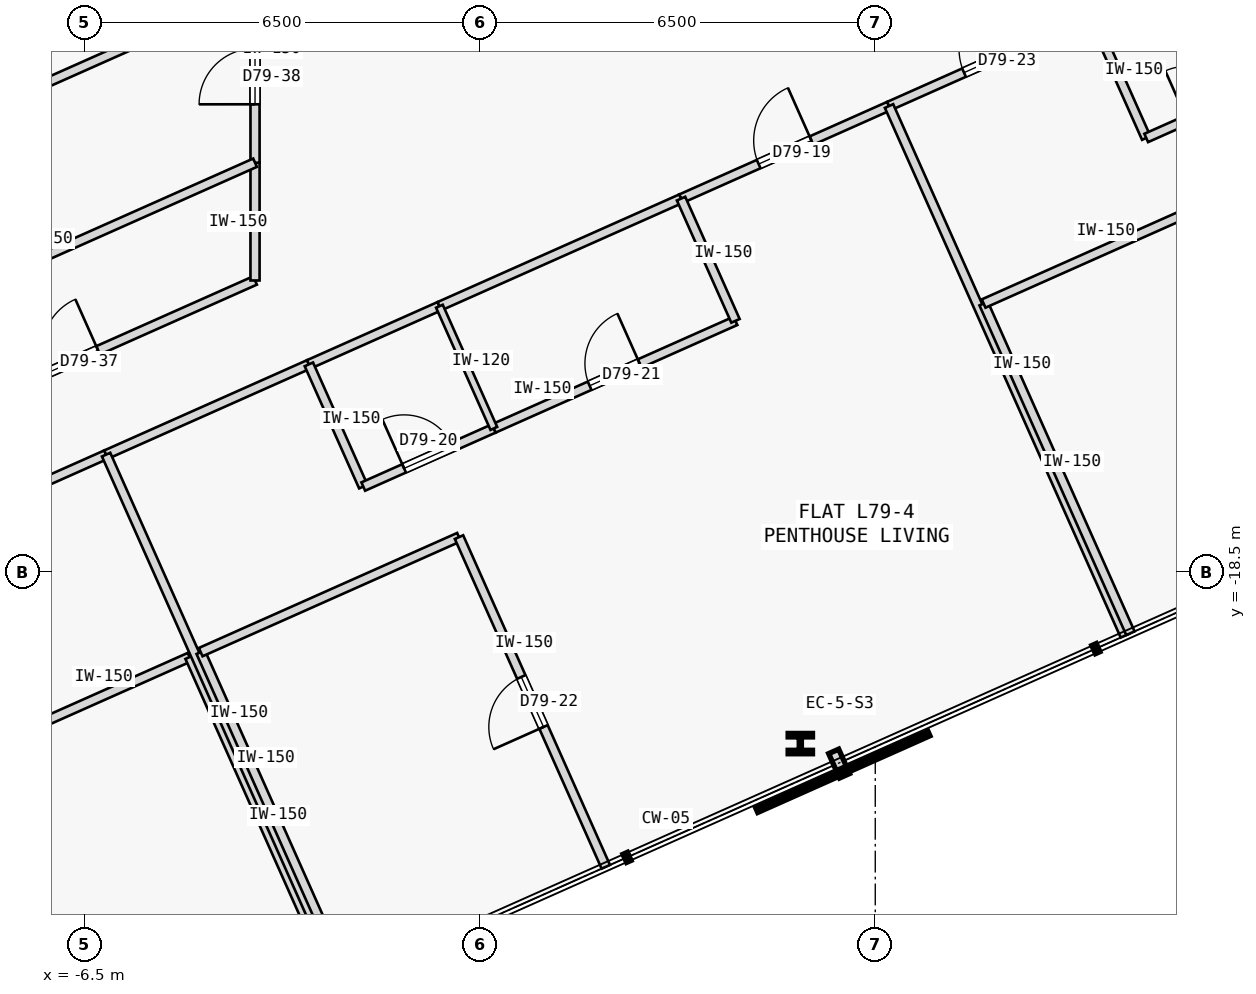
"""IFC4 building model, lengths in metres.
Left out: names, types, materials, properties, quantities, classifications, styles, units other than length and angle.
Written with IfcOpenShell. Run it as: python <this file> out.ifc"""

import sys

from ifc_helpers import new_model, si_unit, direction, frame, frame_2d, origin, origin_2d, place, context, subcontext, project, spatial, rectangle, i_section, extrude, element, fill, save


model = new_model("IFC4")
c1 = context("Model", 3, precision=1e-05, world=origin(), true_north=direction((0.0, 1.0)))
c2 = subcontext(c1, "Body", "Model", "MODEL_VIEW")
j1 = project(units=[si_unit("LENGTHUNIT", "METRE"), si_unit("PLANEANGLEUNIT", "RADIAN")], contexts=[c1])
p1 = place(None, origin())
s1 = spatial("IfcSite", under=j1, at=p1, CompositionType="ELEMENT")
p2 = place(p1, origin())
s2 = spatial("IfcBuilding", under=s1, at=p2, CompositionType="ELEMENT")
p3 = place(p2, frame((0.0, 0.0, 295.3)))
s3 = spatial("IfcBuildingStorey", under=s2, at=p3, CompositionType="ELEMENT", Elevation=295.3)
p4 = place(p3, frame((5.268, -21.319, 0.0), z_axis=(0.0, 0.0, 1.0), x_axis=(1.0, 0.0, 0.0)))
e1 = element("IfcColumn", 1, at=p4, inside=s3, PredefinedType="COLUMN", context=c2, shape_type="SweptSolid", body=[
    extrude(i_section(OverallWidth=0.401, OverallDepth=0.335, WebThickness=0.036, FlangeThickness=0.058, FilletRadius=0.015, at=origin_2d()), origin(), (0.0, 0.0, 1.0), 3.35),
])
p5 = place(p3, frame((-10.221, -18.38, 0.0), z_axis=(0.0, 0.0, 1.0), x_axis=(0.913542602601, 0.406743055543, 0.0)))
e2 = element("IfcWall", 2, at=p5, inside=s3, PredefinedType="PARTITIONING", context=c2, shape_type="SweptSolid", body=[
    extrude(rectangle(XDim=4.458, YDim=0.15, at=frame_2d((2.229, 0.0))), origin(), (0.0, 0.0, 1.0), 3.125),
])
p6 = place(p5, frame((1.754, 0.0, 0.0)))
e3 = element("IfcOpeningElement", 3, at=p6, cuts=e2, PredefinedType="OPENING", context=c2, shape_type="SweptSolid", body=[
    extrude(rectangle(XDim=0.95, YDim=2.15, at=frame_2d((0.475, 1.075))), frame((0.0, 0.085, 0.0), z_axis=(0.0, -1.0, 0.0), x_axis=(1.0, 0.0, 0.0)), (0.0, 0.0, 1.0), 0.17),
])
p7 = place(p3, frame((-6.149, -16.567, 0.0), z_axis=(0.0, 0.0, 1.0), x_axis=(0.913543802, 0.40674036169, 0.0)))
e4 = element("IfcWall", 4, at=p7, inside=s3, PredefinedType="PARTITIONING", context=c2, shape_type="SweptSolid", body=[
    extrude(rectangle(XDim=3.65, YDim=0.15, at=frame_2d((1.825, 0.0))), origin(), (0.0, 0.0, 1.0), 3.125),
])
p8 = place(p3, frame((3.306, -12.357, 0.0), z_axis=(0.0, 0.0, 1.0), x_axis=(0.913550513402, 0.406725287464, 0.0)))
e5 = element("IfcWall", 5, at=p8, inside=s3, PredefinedType="PARTITIONING", context=c2, shape_type="SweptSolid", body=[
    extrude(rectangle(XDim=3.744, YDim=0.15, at=frame_2d((1.872, 0.0))), origin(), (0.0, 0.0, 1.0), 3.125),
])
p9 = place(p8, frame((1.397, 0.0, 0.0)))
e6 = element("IfcOpeningElement", 6, at=p9, cuts=e5, PredefinedType="OPENING", context=c2, shape_type="SweptSolid", body=[
    extrude(rectangle(XDim=0.95, YDim=2.15, at=frame_2d((0.475, 1.075))), frame((0.0, 0.085, 0.0), z_axis=(0.0, -1.0, 0.0), x_axis=(1.0, 0.0, 0.0)), (0.0, 0.0, 1.0), 0.17),
])
p10 = place(p3, frame((-2.814, -15.082, 0.0), z_axis=(0.0, 0.0, 1.0), x_axis=(0.913558622212, 0.406707073682, 0.0)))
e7 = element("IfcWall", 7, at=p10, inside=s3, PredefinedType="PARTITIONING", context=c2, shape_type="SweptSolid", body=[
    extrude(rectangle(XDim=2.35, YDim=0.15, at=frame_2d((1.175, 0.0))), origin(), (0.0, 0.0, 1.0), 3.125),
])
p11 = place(p3, frame((-0.667, -14.126, 0.0), z_axis=(0.0, 0.0, 1.0), x_axis=(0.913545193015, 0.406737237438, 0.0)))
e8 = element("IfcWall", 8, at=p11, inside=s3, PredefinedType="PARTITIONING", context=c2, shape_type="SweptSolid", body=[
    extrude(rectangle(XDim=4.35, YDim=0.15, at=frame_2d((2.175, 0.0))), origin(), (0.0, 0.0, 1.0), 3.125),
])
p12 = place(p3, frame((6.727, -10.834, 0.0), z_axis=(0.0, 0.0, 1.0), x_axis=(0.913543802, 0.40674036169, 0.0)))
e9 = element("IfcWall", 9, at=p12, inside=s3, PredefinedType="PARTITIONING", context=c2, shape_type="SweptSolid", body=[
    extrude(rectangle(XDim=3.65, YDim=0.15, at=frame_2d((1.825, 0.0))), origin(), (0.0, 0.0, 1.0), 3.125),
])
p13 = place(p12, frame((1.35, 0.0, 0.0)))
e10 = element("IfcOpeningElement", 10, at=p13, cuts=e9, PredefinedType="OPENING", context=c2, shape_type="SweptSolid", body=[
    extrude(rectangle(XDim=0.95, YDim=2.15, at=frame_2d((0.475, 1.075))), frame((0.0, 0.085, 0.0), z_axis=(0.0, -1.0, 0.0), x_axis=(1.0, 0.0, 0.0)), (0.0, 0.0, 1.0), 0.17),
])
p14 = place(p3, frame((-9.702, -16.375, 0.0), z_axis=(0.0, 0.0, 1.0), x_axis=(0.913552389019, 0.406721074594, 0.0)))
e11 = element("IfcWall", 11, at=p14, inside=s3, PredefinedType="PARTITIONING", context=c2, shape_type="SweptSolid", body=[
    extrude(rectangle(XDim=6.57, YDim=0.15, at=frame_2d((3.285, 0.0))), origin(), (0.0, 0.0, 1.0), 3.125),
])
p15 = place(p14, frame((2.825, 0.0, 0.0)))
e12 = element("IfcOpeningElement", 12, at=p15, cuts=e11, PredefinedType="OPENING", context=c2, shape_type="SweptSolid", body=[
    extrude(rectangle(XDim=0.92, YDim=2.15, at=frame_2d((0.46, 1.075))), frame((0.0, 0.085, 0.0), z_axis=(0.0, -1.0, 0.0), x_axis=(1.0, 0.0, 0.0)), (0.0, 0.0, 1.0), 0.17),
])
p16 = place(p3, frame((-3.7, -13.703, 0.0), z_axis=(0.0, 0.0, 1.0), x_axis=(0.000126055716, 0.999999992055, 0.0)))
e13 = element("IfcWall", 13, at=p16, inside=s3, PredefinedType="PARTITIONING", context=c2, shape_type="SweptSolid", body=[
    extrude(rectangle(XDim=1.937, YDim=0.15, at=frame_2d((0.968, 0.0))), origin(), (0.0, 0.0, 1.0), 3.125),
])
p17 = place(p3, frame((-3.7, -11.767, 0.0), z_axis=(0.0, 0.0, 1.0), x_axis=(-0.000171850831, 0.999999985234, 0.0)))
e14 = element("IfcWall", 14, at=p17, inside=s3, PredefinedType="PARTITIONING", context=c2, shape_type="SweptSolid", body=[
    extrude(rectangle(XDim=2.841, YDim=0.15, at=frame_2d((1.421, 0.0))), origin(), (0.0, 0.0, 1.0), 3.125),
])
p18 = place(p17, frame((0.961, 0.0, 0.0)))
e15 = element("IfcOpeningElement", 15, at=p18, cuts=e14, PredefinedType="OPENING", context=c2, shape_type="SweptSolid", body=[
    extrude(rectangle(XDim=0.92, YDim=2.15, at=frame_2d((0.46, 1.075))), frame((0.0, 0.085, 0.0), z_axis=(0.0, -1.0, 0.0), x_axis=(1.0, 0.0, 0.0)), (0.0, 0.0, 1.0), 0.17),
])
p19 = place(p3, frame((-6.61, -27.21, 0.0), z_axis=(0.0, 0.0, 1.0), x_axis=(-0.406699433793, 0.913562023375, 0.0)))
e16 = element("IfcWall", 16, at=p19, inside=s3, PredefinedType="PARTITIONING", context=c2, shape_type="SweptSolid", body=[
    extrude(rectangle(XDim=5.935, YDim=0.15, at=frame_2d((2.968, 0.0))), origin(), (0.0, 0.0, 1.0), 3.125),
])
p20 = place(p19, frame((2.518, 0.0, 0.0)))
e17 = element("IfcOpeningElement", 17, at=p20, cuts=e16, PredefinedType="OPENING", context=c2, shape_type="SweptSolid", body=[
    extrude(rectangle(XDim=0.9, YDim=2.15, at=frame_2d((0.45, 1.075))), frame((0.0, 0.085, 0.0), z_axis=(0.0, -1.0, 0.0), x_axis=(1.0, 0.0, 0.0)), (0.0, 0.0, 1.0), 0.17),
])
p21 = place(p3, frame((-9.024, -21.788, 0.0), z_axis=(0.0, 0.0, 1.0), x_axis=(0.913564558304, 0.406693739576, 0.0)))
e18 = element("IfcWall", 18, at=p21, inside=s3, PredefinedType="PARTITIONING", context=c2, shape_type="SweptSolid", body=[
    extrude(rectangle(XDim=4.65, YDim=0.15, at=frame_2d((2.325, 0.0))), origin(), (0.0, 0.0, 1.0), 3.125),
])
p22 = place(p3, frame((-2.362, -25.318, 0.0), z_axis=(0.0, 0.0, 1.0), x_axis=(-0.406714717734, 0.913555219119, 0.0)))
e19 = element("IfcWall", 19, at=p22, inside=s3, PredefinedType="PARTITIONING", context=c2, shape_type="SweptSolid", body=[
    extrude(rectangle(XDim=5.935, YDim=0.15, at=frame_2d((2.967, 0.0))), origin(), (0.0, 0.0, 1.0), 3.125),
])
p23 = place(p3, frame((-2.271, -25.278, 0.0), z_axis=(0.0, 0.0, 1.0), x_axis=(-0.406751296215, 0.913538933504, 0.0)))
e20 = element("IfcWall", 20, at=p23, inside=s3, PredefinedType="PARTITIONING", context=c2, shape_type="SweptSolid", body=[
    extrude(rectangle(XDim=9.535, YDim=0.15, at=frame_2d((4.768, 0.0))), origin(), (0.0, 0.0, 1.0), 3.125),
])
p24 = place(p3, frame((-1.92, -17.092, 0.0), z_axis=(0.0, 0.0, 1.0), x_axis=(-0.406725294076, 0.913550510459, 0.0)))
e21 = element("IfcWall", 21, at=p24, inside=s3, PredefinedType="PARTITIONING", context=c2, shape_type="SweptSolid", body=[
    extrude(rectangle(XDim=2.2, YDim=0.15, at=frame_2d((1.1, 0.0))), origin(), (0.0, 0.0, 1.0), 3.125),
])
p25 = place(p3, frame((-1.92, -17.092, 0.0), z_axis=(0.0, 0.0, 1.0), x_axis=(0.913558622212, 0.406707073682, 0.0)))
e22 = element("IfcWall", 22, at=p25, inside=s3, PredefinedType="PARTITIONING", context=c2, shape_type="SweptSolid", body=[
    extrude(rectangle(XDim=2.35, YDim=0.15, at=frame_2d((1.175, 0.0))), origin(), (0.0, 0.0, 1.0), 3.125),
])
p26 = place(p25, frame((0.735, 0.0, 0.0)))
e23 = element("IfcOpeningElement", 23, at=p26, cuts=e22, PredefinedType="OPENING", context=c2, shape_type="SweptSolid", body=[
    extrude(rectangle(XDim=0.88, YDim=2.15, at=frame_2d((0.44, 1.075))), frame((0.0, 0.085, 0.0), z_axis=(0.0, -1.0, 0.0), x_axis=(1.0, 0.0, 0.0)), (0.0, 0.0, 1.0), 0.17),
])
p27 = place(p3, frame((0.227, -16.136, 0.0), z_axis=(0.0, 0.0, 1.0), x_axis=(0.913545193015, 0.406737237438, 0.0)))
e24 = element("IfcWall", 24, at=p27, inside=s3, PredefinedType="PARTITIONING", context=c2, shape_type="SweptSolid", body=[
    extrude(rectangle(XDim=4.35, YDim=0.15, at=frame_2d((2.175, 0.0))), origin(), (0.0, 0.0, 1.0), 3.125),
])
p28 = place(p27, frame((1.725, 0.0, 0.0)))
e25 = element("IfcOpeningElement", 25, at=p28, cuts=e24, PredefinedType="OPENING", context=c2, shape_type="SweptSolid", body=[
    extrude(rectangle(XDim=0.9, YDim=2.15, at=frame_2d((0.45, 1.075))), frame((0.0, 0.085, 0.0), z_axis=(0.0, -1.0, 0.0), x_axis=(1.0, 0.0, 0.0)), (0.0, 0.0, 1.0), 0.17),
])
p29 = place(p3, frame((4.201, -14.367, 0.0), z_axis=(0.0, 0.0, 1.0), x_axis=(-0.406725294076, 0.913550510459, 0.0)))
e26 = element("IfcWall", 26, at=p29, inside=s3, PredefinedType="PARTITIONING", context=c2, shape_type="SweptSolid", body=[
    extrude(rectangle(XDim=2.2, YDim=0.15, at=frame_2d((1.1, 0.0))), origin(), (0.0, 0.0, 1.0), 3.125),
])
p30 = place(p3, frame((-2.179, -25.237, 0.0), z_axis=(0.0, 0.0, 1.0), x_axis=(-0.406749048544, 0.913539934271, 0.0)))
e27 = element("IfcWall", 27, at=p30, inside=s3, PredefinedType="PARTITIONING", context=c2, shape_type="SweptSolid", body=[
    extrude(rectangle(XDim=5.935, YDim=0.15, at=frame_2d((2.968, 0.0))), origin(), (0.0, 0.0, 1.0), 3.125),
])
p31 = place(p3, frame((-4.593, -19.815, 0.0), z_axis=(0.0, 0.0, 1.0), x_axis=(0.91354505039, 0.40673755778, 0.0)))
e28 = element("IfcWall", 28, at=p31, inside=s3, PredefinedType="PARTITIONING", context=c2, shape_type="SweptSolid", body=[
    extrude(rectangle(XDim=4.65, YDim=0.15, at=frame_2d((2.325, 0.0))), origin(), (0.0, 0.0, 1.0), 3.125),
])
p32 = place(p3, frame((2.069, -23.346, 0.0), z_axis=(0.0, 0.0, 1.0), x_axis=(-0.406699433793, 0.913562023375, 0.0)))
e29 = element("IfcWall", 29, at=p32, inside=s3, PredefinedType="PARTITIONING", context=c2, shape_type="SweptSolid", body=[
    extrude(rectangle(XDim=5.935, YDim=0.15, at=frame_2d((2.968, 0.0))), origin(), (0.0, 0.0, 1.0), 3.125),
])
p33 = place(p32, frame((2.518, 0.0, 0.0)))
e30 = element("IfcOpeningElement", 30, at=p33, cuts=e29, PredefinedType="OPENING", context=c2, shape_type="SweptSolid", body=[
    extrude(rectangle(XDim=0.9, YDim=2.15, at=frame_2d((0.45, 1.075))), frame((0.0, 0.085, 0.0), z_axis=(0.0, -1.0, 0.0), x_axis=(1.0, 0.0, 0.0)), (0.0, 0.0, 1.0), 0.17),
])
p34 = place(p3, frame((10.605, -19.545, 0.0), z_axis=(0.0, 0.0, 1.0), x_axis=(-0.406760810574, 0.913534697196, 0.0)))
e31 = element("IfcWall", 31, at=p34, inside=s3, PredefinedType="PARTITIONING", context=c2, shape_type="SweptSolid", body=[
    extrude(rectangle(XDim=9.535, YDim=0.15, at=frame_2d((4.768, 0.0))), origin(), (0.0, 0.0, 1.0), 3.125),
])
p35 = place(p3, frame((0.227, -16.136, 0.0), z_axis=(0.0, 0.0, 1.0), x_axis=(-0.406725294076, 0.913550510459, 0.0)))
e32 = element("IfcWall", 32, at=p35, inside=s3, PredefinedType="PARTITIONING", context=c2, shape_type="SweptSolid", body=[
    extrude(rectangle(XDim=2.2, YDim=0.12, at=frame_2d((1.1, 0.0))), origin(), (0.0, 0.0, 1.0), 3.125),
])
p36 = place(p3, frame((10.956, -11.36, 0.0), z_axis=(0.0, 0.0, 1.0), x_axis=(-0.406725294076, 0.913550510459, 0.0)))
e33 = element("IfcWall", 33, at=p36, inside=s3, PredefinedType="PARTITIONING", context=c2, shape_type="SweptSolid", body=[
    extrude(rectangle(XDim=2.2, YDim=0.15, at=frame_2d((1.1, 0.0))), origin(), (0.0, 0.0, 1.0), 3.125),
])
p37 = place(p3, frame((10.956, -11.36, 0.0), z_axis=(0.0, 0.0, 1.0), x_axis=(0.913558622212, 0.406707073682, 0.0)))
e34 = element("IfcWall", 34, at=p37, inside=s3, PredefinedType="PARTITIONING", context=c2, shape_type="SweptSolid", body=[
    extrude(rectangle(XDim=2.35, YDim=0.15, at=frame_2d((1.175, 0.0))), origin(), (0.0, 0.0, 1.0), 3.125),
])
p38 = place(p37, frame((0.735, 0.0, 0.0)))
e35 = element("IfcOpeningElement", 35, at=p38, cuts=e34, PredefinedType="OPENING", context=c2, shape_type="SweptSolid", body=[
    extrude(rectangle(XDim=0.88, YDim=2.15, at=frame_2d((0.44, 1.075))), frame((0.0, 0.085, 0.0), z_axis=(0.0, -1.0, 0.0), x_axis=(1.0, 0.0, 0.0)), (0.0, 0.0, 1.0), 0.17),
])
p39 = place(p3, frame((10.696, -19.504, 0.0), z_axis=(0.0, 0.0, 1.0), x_axis=(-0.406749048544, 0.913539934271, 0.0)))
e36 = element("IfcWall", 36, at=p39, inside=s3, PredefinedType="PARTITIONING", context=c2, shape_type="SweptSolid", body=[
    extrude(rectangle(XDim=5.935, YDim=0.15, at=frame_2d((2.968, 0.0))), origin(), (0.0, 0.0, 1.0), 3.125),
])
p40 = place(p3, frame((8.282, -14.083, 0.0), z_axis=(0.0, 0.0, 1.0), x_axis=(0.91354505039, 0.40673755778, 0.0)))
e37 = element("IfcWall", 37, at=p40, inside=s3, PredefinedType="PARTITIONING", context=c2, shape_type="SweptSolid", body=[
    extrude(rectangle(XDim=4.65, YDim=0.15, at=frame_2d((2.325, 0.0))), origin(), (0.0, 0.0, 1.0), 3.125),
])
p41 = place(p3, frame((-10.421, -14.76, 0.0), z_axis=(0.0, 0.0, 1.0), x_axis=(0.913533574053, 0.406763333006, 0.0)))
e38 = element("IfcWall", 38, at=p41, inside=s3, PredefinedType="PARTITIONING", context=c2, shape_type="SweptSolid", body=[
    extrude(rectangle(XDim=7.358, YDim=0.15, at=frame_2d((3.679, 0.0))), origin(), (0.0, 0.0, 1.0), 3.125),
])
p42 = place(p3, frame((-11.477, -12.388, 0.0), z_axis=(0.0, 0.0, 1.0), x_axis=(0.913542897736, 0.406742392673, 0.0)))
e39 = element("IfcWall", 39, at=p42, inside=s3, PredefinedType="PARTITIONING", context=c2, shape_type="SweptSolid", body=[
    extrude(rectangle(XDim=8.513, YDim=0.15, at=frame_2d((4.257, 0.0))), origin(), (0.0, 0.0, 1.0), 3.125),
])
p43 = place(p9, origin())
e40 = element("IfcDoor", 40, at=p43, inside=s3, OperationType="SINGLE_SWING_RIGHT", PredefinedType="DOOR", context=c2, shape_type="SweptSolid", body=[
    extrude(rectangle(XDim=0.95, YDim=2.15, at=frame_2d((0.475, 1.075))), frame((0.0, 0.025, 0.0), z_axis=(0.0, -1.0, 0.0), x_axis=(1.0, 0.0, 0.0)), (0.0, 0.0, 1.0), 0.05),
])
fill(e6, e40)
p44 = place(p26, origin())
e41 = element("IfcDoor", 41, at=p44, inside=s3, OperationType="SINGLE_SWING_LEFT", PredefinedType="DOOR", context=c2, shape_type="SweptSolid", body=[
    extrude(rectangle(XDim=0.88, YDim=2.15, at=frame_2d((0.44, 1.075))), frame((0.0, 0.025, 0.0), z_axis=(0.0, -1.0, 0.0), x_axis=(1.0, 0.0, 0.0)), (0.0, 0.0, 1.0), 0.05),
])
fill(e23, e41)
p45 = place(p28, origin())
e42 = element("IfcDoor", 42, at=p45, inside=s3, OperationType="SINGLE_SWING_RIGHT", PredefinedType="DOOR", context=c2, shape_type="SweptSolid", body=[
    extrude(rectangle(XDim=0.9, YDim=2.15, at=frame_2d((0.45, 1.075))), frame((0.0, 0.025, 0.0), z_axis=(0.0, -1.0, 0.0), x_axis=(1.0, 0.0, 0.0)), (0.0, 0.0, 1.0), 0.05),
])
fill(e25, e42)
p46 = place(p33, origin())
e43 = element("IfcDoor", 43, at=p46, inside=s3, OperationType="SINGLE_SWING_LEFT", PredefinedType="DOOR", context=c2, shape_type="SweptSolid", body=[
    extrude(rectangle(XDim=0.9, YDim=2.15, at=frame_2d((0.45, 1.075))), frame((0.0, 0.025, 0.0), z_axis=(0.0, -1.0, 0.0), x_axis=(1.0, 0.0, 0.0)), (0.0, 0.0, 1.0), 0.05),
])
fill(e30, e43)
p47 = place(p13, origin())
e44 = element("IfcDoor", 44, at=p47, inside=s3, OperationType="SINGLE_SWING_RIGHT", PredefinedType="DOOR", context=c2, shape_type="SweptSolid", body=[
    extrude(rectangle(XDim=0.95, YDim=2.15, at=frame_2d((0.475, 1.075))), frame((0.0, 0.025, 0.0), z_axis=(0.0, -1.0, 0.0), x_axis=(1.0, 0.0, 0.0)), (0.0, 0.0, 1.0), 0.05),
])
fill(e10, e44)
p48 = place(p15, origin())
e45 = element("IfcDoor", 45, at=p48, inside=s3, OperationType="SINGLE_SWING_RIGHT", PredefinedType="DOOR", context=c2, shape_type="SweptSolid", body=[
    extrude(rectangle(XDim=0.92, YDim=2.15, at=frame_2d((0.46, 1.075))), frame((0.0, 0.025, 0.0), z_axis=(0.0, -1.0, 0.0), x_axis=(1.0, 0.0, 0.0)), (0.0, 0.0, 1.0), 0.05),
])
fill(e12, e45)
p49 = place(p18, origin())
e46 = element("IfcDoor", 46, at=p49, inside=s3, OperationType="SINGLE_SWING_LEFT", PredefinedType="DOOR", context=c2, shape_type="SweptSolid", body=[
    extrude(rectangle(XDim=0.92, YDim=2.15, at=frame_2d((0.46, 1.075))), frame((0.0, 0.025, 0.0), z_axis=(0.0, -1.0, 0.0), x_axis=(1.0, 0.0, 0.0)), (0.0, 0.0, 1.0), 0.05),
])
fill(e15, e46)
save(model, sys.argv[1])
